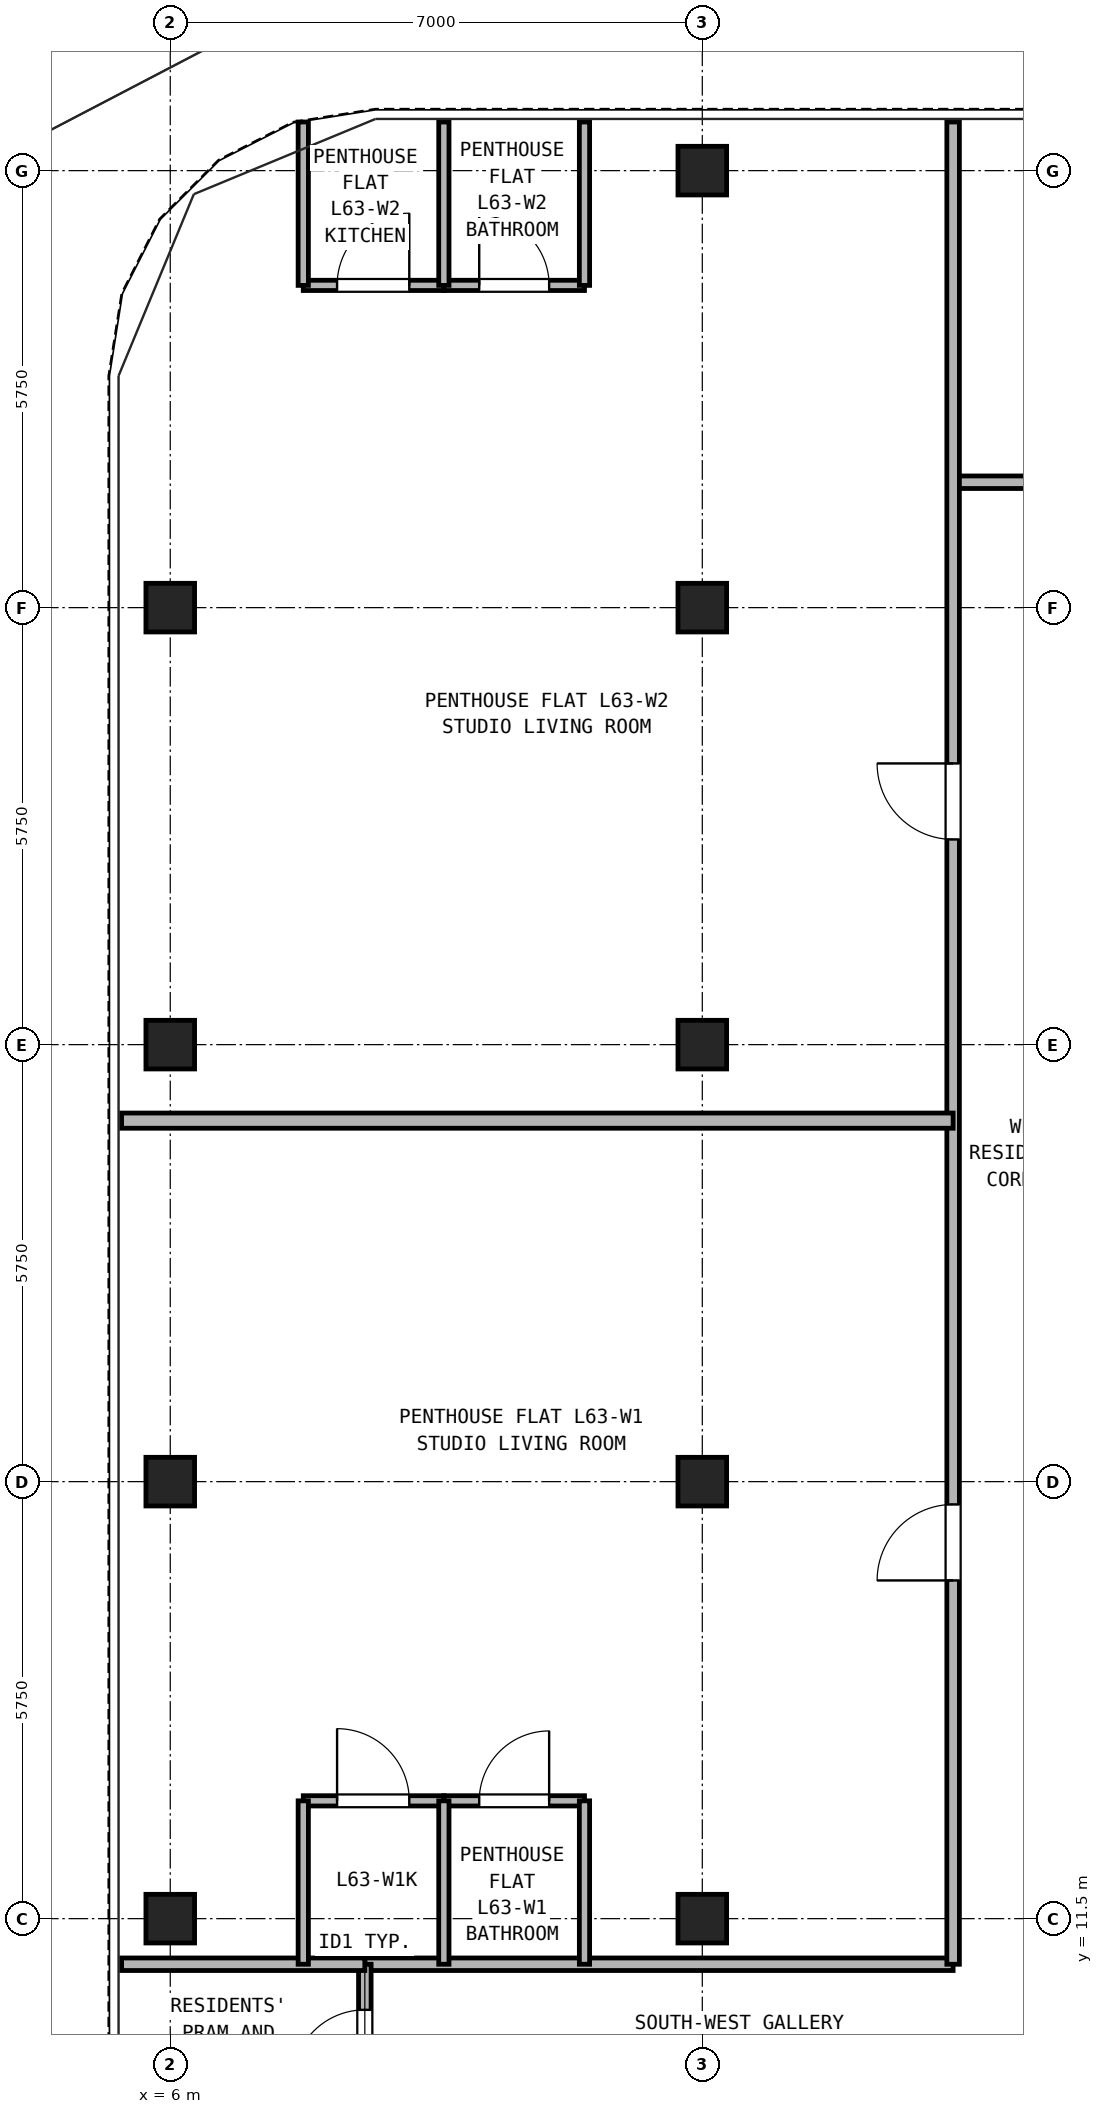
"""IFC4 building model, lengths in metres.
Left out: names, types, materials, properties, quantities, classifications, styles, units other than length and angle.
Written with IfcOpenShell. Run it as: python <this file> out.ifc"""

import sys

from ifc_helpers import new_model, si_unit, direction, frame, frame_2d, origin, origin_2d, place, context, subcontext, project, spatial, rectangle, hollow_rectangle, extrude, source, transform, mapped, element, fill, save


model = new_model("IFC4")
c1 = context("Model", 3, precision=1e-05, world=origin(), true_north=direction((0.0, 1.0)))
c2 = subcontext(c1, "Body", "Model", "MODEL_VIEW")
j1 = project(units=[si_unit("LENGTHUNIT", "METRE"), si_unit("PLANEANGLEUNIT", "RADIAN")], contexts=[c1])
p1 = place(None, origin())
s1 = spatial("IfcSite", under=j1, at=p1, CompositionType="ELEMENT")
p2 = place(p1, origin())
s2 = spatial("IfcBuilding", under=s1, at=p2, CompositionType="ELEMENT")
p3 = place(p2, frame((0.0, 0.0, 223.3)))
s3 = spatial("IfcBuildingStorey", under=s2, at=p3, CompositionType="ELEMENT", Elevation=223.3)
m1 = source(origin(), c2, "Body", "SweptSolid", [
    extrude(hollow_rectangle(XDim=0.64, YDim=0.64, WallThickness=0.035, at=origin_2d()), origin(), (0.0, 0.0, 1.0), 2.98),
])
for number, where, z_axis, x_axis in (
    (1, (13.0, 34.5, 0.0), (0.0, 0.0, 1.0), (1.0, 0.0, 0.0)),
    (2, (6.0, 11.5, 0.0), (0.0, 0.0, 1.0), (1.0, 0.0, 0.0)),
    (3, (6.0, 17.25, 0.0), (0.0, 0.0, 1.0), (1.0, 0.0, 0.0)),
    (4, (6.0, 23.0, 0.0), (0.0, 0.0, 1.0), (1.0, 0.0, 0.0)),
    (5, (6.0, 28.75, 0.0), (0.0, 0.0, 1.0), (1.0, 0.0, 0.0)),
    (6, (13.0, 11.5, 0.0), (0.0, 0.0, 1.0), (1.0, 0.0, 0.0)),
    (7, (13.0, 17.25, 0.0), (0.0, 0.0, 1.0), (1.0, 0.0, 0.0)),
    (8, (13.0, 23.0, 0.0), (0.0, 0.0, 1.0), (1.0, 0.0, 0.0)),
    (9, (13.0, 28.75, 0.0), (0.0, 0.0, 1.0), (1.0, 0.0, 0.0)),
):
    element("IfcColumn", number, at=place(p3, frame(where, z_axis=z_axis, x_axis=x_axis)), inside=s3, PredefinedType="COLUMN", context=c2, shape_type="MappedRepresentation", body=[
        mapped(m1, transform((0.0, 0.0, 0.0), x_axis=(1.0, 0.0, 0.0), y_axis=(0.0, 1.0, 0.0), z_axis=(0.0, 0.0, 1.0), scale=1.0)),
    ])
p4 = place(p3, frame((8.56, 10.9, 0.0), z_axis=(0.0, 0.0, 1.0), x_axis=(1.0, 0.0, 0.0)))
e10 = element("IfcWall", 10, at=p4, inside=s3, PredefinedType="PARTITIONING", context=c2, shape_type="SweptSolid", body=[
    extrude(rectangle(XDim=7.74, YDim=0.165, at=frame_2d((3.87, 0.0))), origin(), (0.0, 0.0, 1.0), 2.98),
])
p5 = place(p3, frame((8.56, 8.9, 0.0), z_axis=(0.0, 0.0, 1.0), x_axis=(0.0, 1.0, 0.0)))
e11 = element("IfcWall", 11, at=p5, inside=s3, PredefinedType="PARTITIONING", context=c2, shape_type="SweptSolid", body=[
    extrude(rectangle(XDim=2.0, YDim=0.165, at=frame_2d((1.0, 0.0))), origin(), (0.0, 0.0, 1.0), 2.98),
])
p6 = place(p5, frame((0.45, 0.0, 0.0)))
e12 = element("IfcOpeningElement", 12, at=p6, cuts=e11, PredefinedType="OPENING", context=c2, shape_type="SweptSolid", body=[
    extrude(rectangle(XDim=0.95, YDim=2.15, at=frame_2d((0.475, 1.075))), frame((0.0, 0.093, 0.0), z_axis=(0.0, -1.0, 0.0), x_axis=(1.0, 0.0, 0.0)), (0.0, 0.0, 1.0), 0.185),
])
p7 = place(p3, frame((16.3, 30.4, 0.0), z_axis=(0.0, 0.0, 1.0), x_axis=(1.0, 0.0, 0.0)))
e13 = element("IfcWall", 13, at=p7, inside=s3, PredefinedType="PARTITIONING", context=c2, shape_type="SweptSolid", body=[
    extrude(rectangle(XDim=14.4, YDim=0.165, at=frame_2d((7.2, 0.0))), origin(), (0.0, 0.0, 1.0), 2.98),
])
p8 = place(p7, frame((2.35, 0.0, 0.0)))
e14 = element("IfcOpeningElement", 14, at=p8, cuts=e13, PredefinedType="OPENING", context=c2, shape_type="SweptSolid", body=[
    extrude(rectangle(XDim=0.95, YDim=2.15, at=frame_2d((0.475, 1.075))), frame((0.0, 0.093, 0.0), z_axis=(0.0, -1.0, 0.0), x_axis=(1.0, 0.0, 0.0)), (0.0, 0.0, 1.0), 0.185),
])
p9 = place(p7, frame((7.25, 0.0, 0.0)))
e15 = element("IfcOpeningElement", 15, at=p9, cuts=e13, PredefinedType="OPENING", context=c2, shape_type="SweptSolid", body=[
    extrude(rectangle(XDim=0.95, YDim=2.15, at=frame_2d((0.475, 1.075))), frame((0.0, 0.093, 0.0), z_axis=(0.0, -1.0, 0.0), x_axis=(1.0, 0.0, 0.0)), (0.0, 0.0, 1.0), 0.185),
])
p10 = place(p7, frame((11.6, 0.0, 0.0)))
e16 = element("IfcOpeningElement", 16, at=p10, cuts=e13, PredefinedType="OPENING", context=c2, shape_type="SweptSolid", body=[
    extrude(rectangle(XDim=0.92, YDim=2.1, at=frame_2d((0.46, 1.05))), frame((0.0, 0.093, 0.0), z_axis=(0.0, -1.0, 0.0), x_axis=(1.0, 0.0, 0.0)), (0.0, 0.0, 1.0), 0.185),
])
p11 = place(p3, frame((16.3, 10.9, 0.0), z_axis=(0.0, 0.0, 1.0), x_axis=(0.0, 1.0, 0.0)))
e17 = element("IfcWall", 17, at=p11, inside=s3, PredefinedType="PARTITIONING", context=c2, shape_type="SweptSolid", body=[
    extrude(rectangle(XDim=24.24, YDim=0.165, at=frame_2d((12.12, 0.0))), origin(), (0.0, 0.0, 1.0), 2.98),
])
p12 = place(p11, frame((5.05, 0.0, 0.0)))
e18 = element("IfcOpeningElement", 18, at=p12, cuts=e17, PredefinedType="OPENING", context=c2, shape_type="SweptSolid", body=[
    extrude(rectangle(XDim=1.0, YDim=2.15, at=frame_2d((0.5, 1.075))), frame((0.0, 0.093, 0.0), z_axis=(0.0, -1.0, 0.0), x_axis=(1.0, 0.0, 0.0)), (0.0, 0.0, 1.0), 0.185),
])
p13 = place(p11, frame((14.8, 0.0, 0.0)))
e19 = element("IfcOpeningElement", 19, at=p13, cuts=e17, PredefinedType="OPENING", context=c2, shape_type="SweptSolid", body=[
    extrude(rectangle(XDim=1.0, YDim=2.15, at=frame_2d((0.5, 1.075))), frame((0.0, 0.093, 0.0), z_axis=(0.0, -1.0, 0.0), x_axis=(1.0, 0.0, 0.0)), (0.0, 0.0, 1.0), 0.185),
])
p14 = place(p3, frame((5.36, 10.9, 0.0), z_axis=(0.0, 0.0, 1.0), x_axis=(1.0, 0.0, 0.0)))
e20 = element("IfcWall", 20, at=p14, inside=s3, PredefinedType="PARTITIONING", context=c2, shape_type="SweptSolid", body=[
    extrude(rectangle(XDim=3.2, YDim=0.165, at=frame_2d((1.6, 0.0))), origin(), (0.0, 0.0, 1.0), 2.98),
])
p15 = place(p3, frame((7.75, 13.05, 0.0), z_axis=(0.0, 0.0, 1.0), x_axis=(1.0, 0.0, 0.0)))
e21 = element("IfcWall", 21, at=p15, inside=s3, PredefinedType="PARTITIONING", context=c2, shape_type="SweptSolid", body=[
    extrude(rectangle(XDim=1.85, YDim=0.135, at=frame_2d((0.925, 0.0))), origin(), (0.0, 0.0, 1.0), 2.98),
])
p16 = place(p15, frame((0.445, 0.0, 0.0)))
e22 = element("IfcOpeningElement", 22, at=p16, cuts=e21, PredefinedType="OPENING", context=c2, shape_type="SweptSolid", body=[
    extrude(rectangle(XDim=0.95, YDim=2.15, at=frame_2d((0.475, 1.075))), frame((0.0, 0.077, 0.0), z_axis=(0.0, -1.0, 0.0), x_axis=(1.0, 0.0, 0.0)), (0.0, 0.0, 1.0), 0.155),
])
p17 = place(p3, frame((9.6, 13.05, 0.0), z_axis=(0.0, 0.0, 1.0), x_axis=(1.0, 0.0, 0.0)))
e23 = element("IfcWall", 23, at=p17, inside=s3, PredefinedType="PARTITIONING", context=c2, shape_type="SweptSolid", body=[
    extrude(rectangle(XDim=1.85, YDim=0.135, at=frame_2d((0.925, 0.0))), origin(), (0.0, 0.0, 1.0), 2.98),
])
p18 = place(p17, frame((0.465, 0.0, 0.0)))
e24 = element("IfcOpeningElement", 24, at=p18, cuts=e23, PredefinedType="OPENING", context=c2, shape_type="SweptSolid", body=[
    extrude(rectangle(XDim=0.92, YDim=2.1, at=frame_2d((0.46, 1.05))), frame((0.0, 0.077, 0.0), z_axis=(0.0, -1.0, 0.0), x_axis=(1.0, 0.0, 0.0)), (0.0, 0.0, 1.0), 0.155),
])
for number, where, z_axis, x_axis in (
    (25, (7.75, 10.9, 0.0), (0.0, 0.0, 1.0), (0.0, 1.0, 0.0)),
    (26, (9.6, 10.9, 0.0), (0.0, 0.0, 1.0), (0.0, 1.0, 0.0)),
    (27, (11.45, 10.9, 0.0), (0.0, 0.0, 1.0), (0.0, 1.0, 0.0)),
):
    element("IfcWall", number, at=place(p3, frame(where, z_axis=z_axis, x_axis=x_axis)), inside=s3, PredefinedType="PARTITIONING", context=c2, shape_type="SweptSolid", body=[
        extrude(rectangle(XDim=2.15, YDim=0.135, at=frame_2d((1.075, 0.0))), origin(), (0.0, 0.0, 1.0), 2.98),
    ])
p19 = place(p3, frame((5.36, 22.0, 0.0), z_axis=(0.0, 0.0, 1.0), x_axis=(1.0, 0.0, 0.0)))
e28 = element("IfcWall", 28, at=p19, inside=s3, PredefinedType="PARTITIONING", context=c2, shape_type="SweptSolid", body=[
    extrude(rectangle(XDim=10.94, YDim=0.2, at=frame_2d((5.47, 0.0))), origin(), (0.0, 0.0, 1.0), 2.98),
])
p20 = place(p3, frame((7.75, 32.99, 0.0), z_axis=(0.0, 0.0, 1.0), x_axis=(1.0, 0.0, 0.0)))
e29 = element("IfcWall", 29, at=p20, inside=s3, PredefinedType="PARTITIONING", context=c2, shape_type="SweptSolid", body=[
    extrude(rectangle(XDim=1.85, YDim=0.135, at=frame_2d((0.925, 0.0))), origin(), (0.0, 0.0, 1.0), 2.98),
])
p21 = place(p20, frame((0.445, 0.0, 0.0)))
e30 = element("IfcOpeningElement", 30, at=p21, cuts=e29, PredefinedType="OPENING", context=c2, shape_type="SweptSolid", body=[
    extrude(rectangle(XDim=0.95, YDim=2.15, at=frame_2d((0.475, 1.075))), frame((0.0, 0.077, 0.0), z_axis=(0.0, -1.0, 0.0), x_axis=(1.0, 0.0, 0.0)), (0.0, 0.0, 1.0), 0.155),
])
p22 = place(p3, frame((9.6, 32.99, 0.0), z_axis=(0.0, 0.0, 1.0), x_axis=(1.0, 0.0, 0.0)))
e31 = element("IfcWall", 31, at=p22, inside=s3, PredefinedType="PARTITIONING", context=c2, shape_type="SweptSolid", body=[
    extrude(rectangle(XDim=1.85, YDim=0.135, at=frame_2d((0.925, 0.0))), origin(), (0.0, 0.0, 1.0), 2.98),
])
p23 = place(p22, frame((0.465, 0.0, 0.0)))
e32 = element("IfcOpeningElement", 32, at=p23, cuts=e31, PredefinedType="OPENING", context=c2, shape_type="SweptSolid", body=[
    extrude(rectangle(XDim=0.92, YDim=2.1, at=frame_2d((0.46, 1.05))), frame((0.0, 0.077, 0.0), z_axis=(0.0, -1.0, 0.0), x_axis=(1.0, 0.0, 0.0)), (0.0, 0.0, 1.0), 0.155),
])
for number, where, z_axis, x_axis in (
    (33, (7.75, 32.99, 0.0), (0.0, 0.0, 1.0), (0.0, 1.0, 0.0)),
    (34, (9.6, 32.99, 0.0), (0.0, 0.0, 1.0), (0.0, 1.0, 0.0)),
    (35, (11.45, 32.99, 0.0), (0.0, 0.0, 1.0), (0.0, 1.0, 0.0)),
):
    element("IfcWall", number, at=place(p3, frame(where, z_axis=z_axis, x_axis=x_axis)), inside=s3, PredefinedType="PARTITIONING", context=c2, shape_type="SweptSolid", body=[
        extrude(rectangle(XDim=2.15, YDim=0.135, at=frame_2d((1.075, 0.0))), origin(), (0.0, 0.0, 1.0), 2.98),
    ])
p24 = place(p6, frame((0.95, 0.0, 0.0), z_axis=(0.0, 0.0, 1.0), x_axis=(-1.0, 0.0, 0.0)))
e36 = element("IfcDoor", 36, at=p24, inside=s3, OperationType="SINGLE_SWING_LEFT", PredefinedType="DOOR", context=c2, shape_type="SweptSolid", body=[
    extrude(rectangle(XDim=0.95, YDim=2.15, at=frame_2d((0.475, 1.075))), frame((0.0, 0.025, 0.0), z_axis=(0.0, -1.0, 0.0), x_axis=(1.0, 0.0, 0.0)), (0.0, 0.0, 1.0), 0.05),
])
fill(e12, e36)
p25 = place(p16, origin())
e37 = element("IfcDoor", 37, at=p25, inside=s3, OperationType="SINGLE_SWING_LEFT", PredefinedType="DOOR", context=c2, shape_type="SweptSolid", body=[
    extrude(rectangle(XDim=0.95, YDim=2.15, at=frame_2d((0.475, 1.075))), frame((0.0, 0.025, 0.0), z_axis=(0.0, -1.0, 0.0), x_axis=(1.0, 0.0, 0.0)), (0.0, 0.0, 1.0), 0.05),
])
fill(e22, e37)
p26 = place(p18, origin())
e38 = element("IfcDoor", 38, at=p26, inside=s3, OperationType="SINGLE_SWING_RIGHT", PredefinedType="DOOR", context=c2, shape_type="SweptSolid", body=[
    extrude(rectangle(XDim=0.92, YDim=2.1, at=frame_2d((0.46, 1.05))), frame((0.0, 0.025, 0.0), z_axis=(0.0, -1.0, 0.0), x_axis=(1.0, 0.0, 0.0)), (0.0, 0.0, 1.0), 0.05),
])
fill(e24, e38)
p27 = place(p12, origin())
e39 = element("IfcDoor", 39, at=p27, inside=s3, OperationType="SINGLE_SWING_LEFT", PredefinedType="DOOR", context=c2, shape_type="SweptSolid", body=[
    extrude(rectangle(XDim=1.0, YDim=2.15, at=frame_2d((0.5, 1.075))), frame((0.0, 0.025, 0.0), z_axis=(0.0, -1.0, 0.0), x_axis=(1.0, 0.0, 0.0)), (0.0, 0.0, 1.0), 0.05),
])
fill(e18, e39)
p28 = place(p21, frame((0.95, 0.0, 0.0), z_axis=(0.0, 0.0, 1.0), x_axis=(-1.0, 0.0, 0.0)))
e40 = element("IfcDoor", 40, at=p28, inside=s3, OperationType="SINGLE_SWING_RIGHT", PredefinedType="DOOR", context=c2, shape_type="SweptSolid", body=[
    extrude(rectangle(XDim=0.95, YDim=2.15, at=frame_2d((0.475, 1.075))), frame((0.0, 0.025, 0.0), z_axis=(0.0, -1.0, 0.0), x_axis=(1.0, 0.0, 0.0)), (0.0, 0.0, 1.0), 0.05),
])
fill(e30, e40)
p29 = place(p23, frame((0.92, 0.0, 0.0), z_axis=(0.0, 0.0, 1.0), x_axis=(-1.0, 0.0, 0.0)))
e41 = element("IfcDoor", 41, at=p29, inside=s3, OperationType="SINGLE_SWING_LEFT", PredefinedType="DOOR", context=c2, shape_type="SweptSolid", body=[
    extrude(rectangle(XDim=0.92, YDim=2.1, at=frame_2d((0.46, 1.05))), frame((0.0, 0.025, 0.0), z_axis=(0.0, -1.0, 0.0), x_axis=(1.0, 0.0, 0.0)), (0.0, 0.0, 1.0), 0.05),
])
fill(e32, e41)
p30 = place(p13, origin())
e42 = element("IfcDoor", 42, at=p30, inside=s3, OperationType="SINGLE_SWING_RIGHT", PredefinedType="DOOR", context=c2, shape_type="SweptSolid", body=[
    extrude(rectangle(XDim=1.0, YDim=2.15, at=frame_2d((0.5, 1.075))), frame((0.0, 0.025, 0.0), z_axis=(0.0, -1.0, 0.0), x_axis=(1.0, 0.0, 0.0)), (0.0, 0.0, 1.0), 0.05),
])
fill(e19, e42)
save(model, sys.argv[1])
